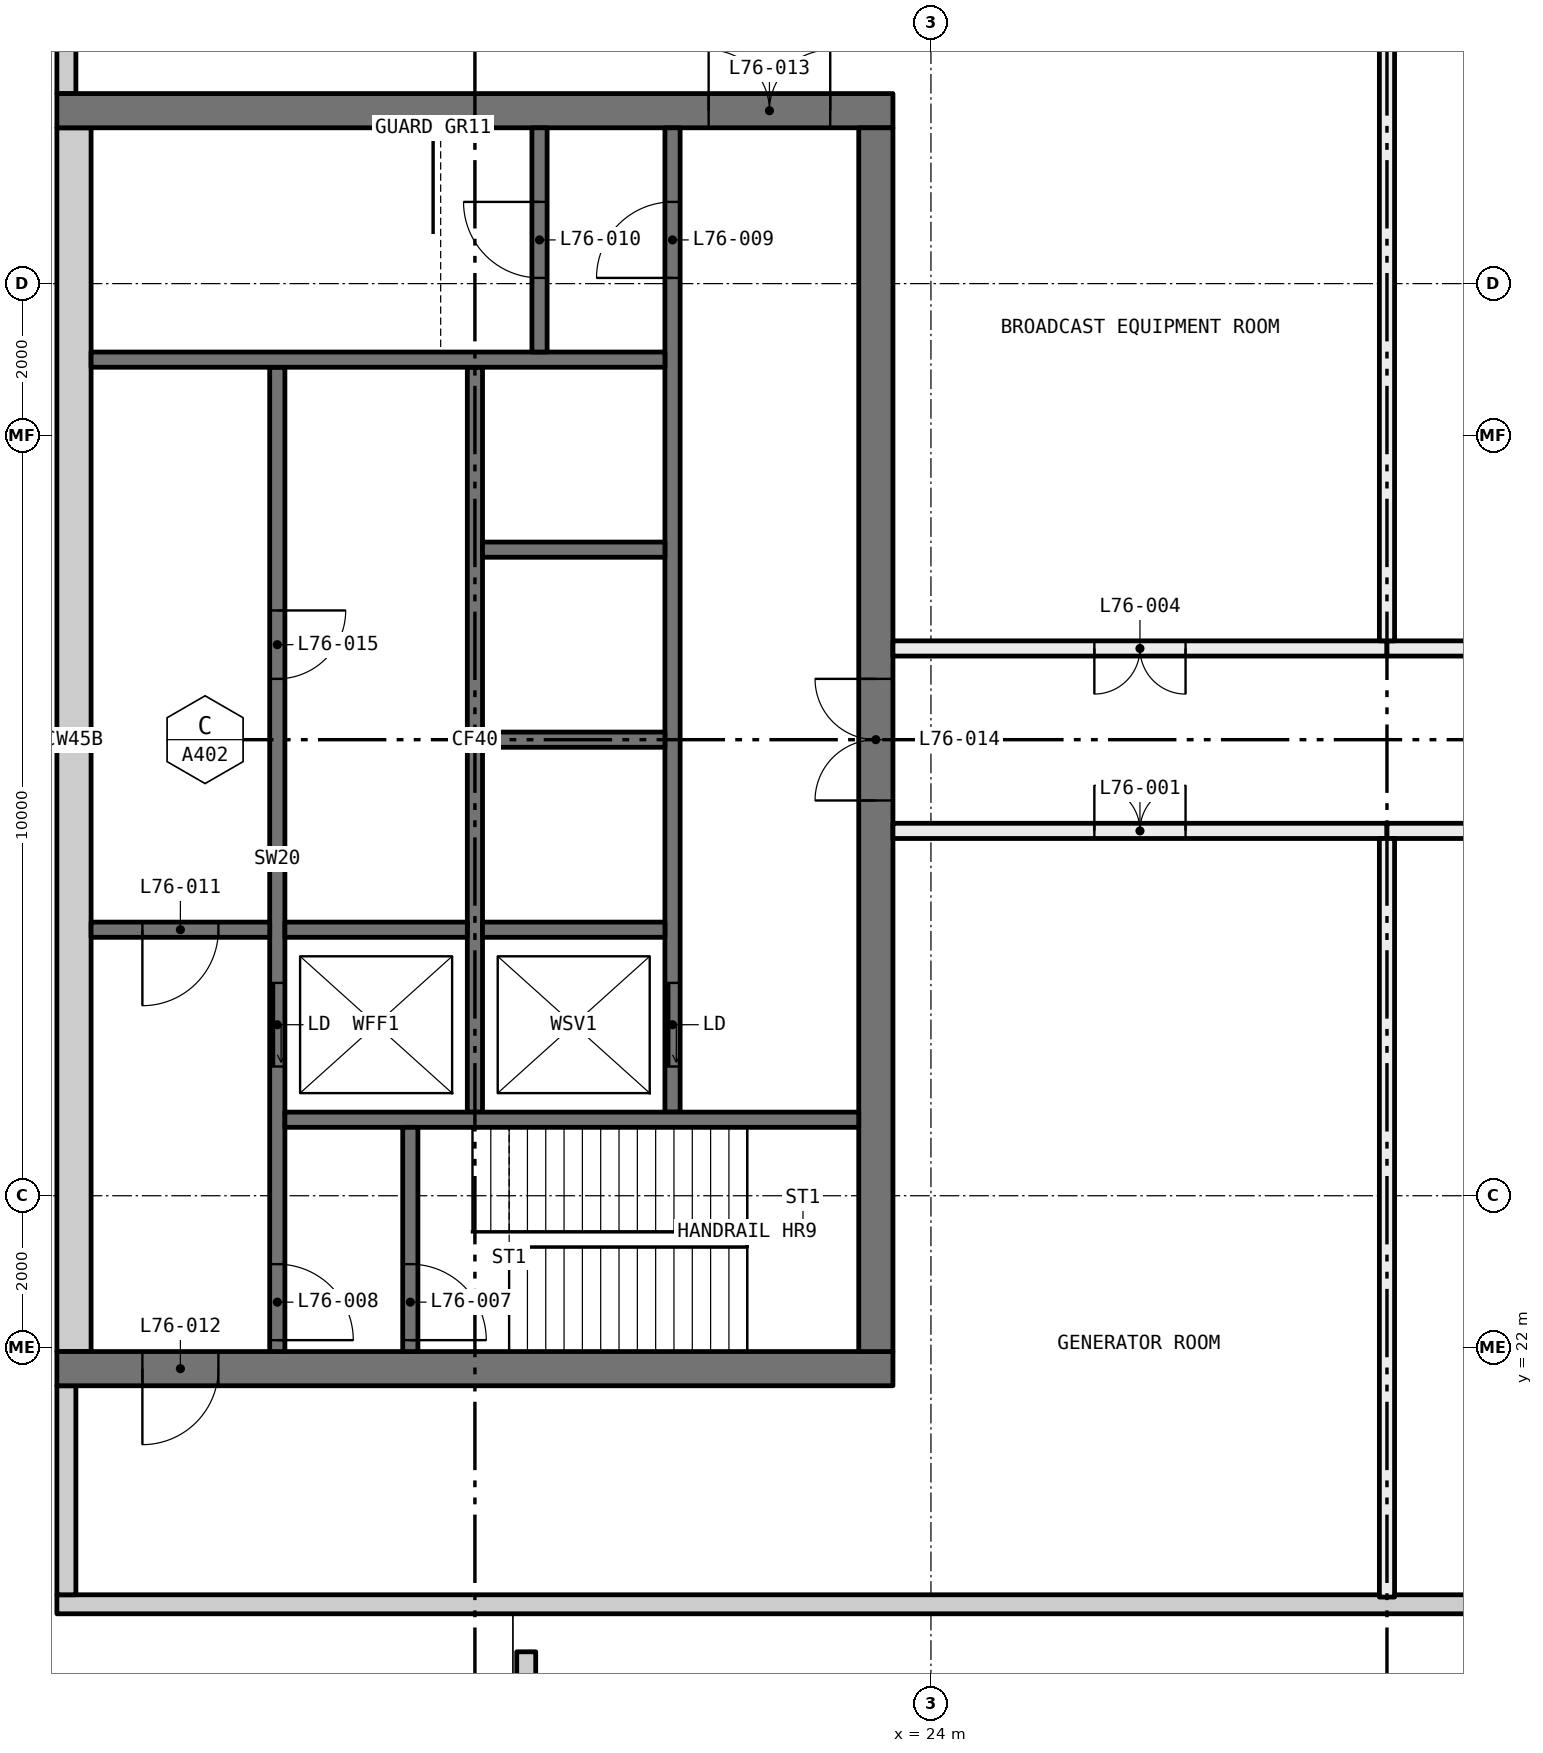
"""IFC4 building model, lengths in metres.
Left out: names, types, materials, properties, quantities, classifications, styles, units other than length and angle.
Written with IfcOpenShell. Run it as: python <this file> out.ifc"""

import sys

from ifc_helpers import new_model, si_unit, direction, frame, frame_2d, origin, place, context, subcontext, project, spatial, rectangle, extrude, element, fill, save


model = new_model("IFC4")
c1 = context("Model", 3, precision=1e-05, world=origin(), true_north=direction((0.0, 1.0)))
c2 = subcontext(c1, "Body", "Model", "MODEL_VIEW")
j1 = project(units=[si_unit("LENGTHUNIT", "METRE"), si_unit("PLANEANGLEUNIT", "RADIAN")], contexts=[c1])
p1 = place(None, origin())
s1 = spatial("IfcSite", under=j1, at=p1, CompositionType="ELEMENT")
p2 = place(p1, origin())
s2 = spatial("IfcBuilding", under=s1, at=p2, CompositionType="ELEMENT")
p3 = place(p2, frame((0.0, 0.0, 283.35)))
s3 = spatial("IfcBuildingStorey", under=s2, at=p3, CompositionType="ELEMENT", Elevation=283.35)
p4 = place(p3, frame((18.675, 12.8, 0.0), z_axis=(0.0, 0.0, 1.0), x_axis=(0.0, 1.0, 0.0)))
e1 = element("IfcWall", 1, at=p4, inside=s3, PredefinedType="PARAPET", context=c2, shape_type="SweptSolid", body=[
    extrude(rectangle(XDim=5.2, YDim=0.25, at=frame_2d((2.6, 0.0))), origin(), (0.0, 0.0, 1.0), 1.1),
])
p5 = place(p3, frame((23.5, 28.8, 0.0), z_axis=(0.0, 0.0, 1.0), x_axis=(1.0, 0.0, 0.0)))
e2 = element("IfcWall", 2, at=p5, inside=s3, PredefinedType="PARTITIONING", context=c2, shape_type="SweptSolid", body=[
    extrude(rectangle(XDim=6.5, YDim=0.2, at=frame_2d((3.25, 0.0))), origin(), (0.0, 0.0, 1.0), 3.6),
])
p6 = place(p5, frame((2.65, 0.0, 0.0)))
e3 = element("IfcOpeningElement", 3, at=p6, cuts=e2, PredefinedType="OPENING", context=c2, shape_type="SweptSolid", body=[
    extrude(rectangle(XDim=1.2, YDim=2.1, at=frame_2d((0.6, 1.05))), frame((0.0, 0.11, 0.0), z_axis=(0.0, -1.0, 0.0), x_axis=(1.0, 0.0, 0.0)), (0.0, 0.0, 1.0), 0.22),
])
p7 = place(p3, frame((30.0, 28.8, 0.0), z_axis=(0.0, 0.0, 1.0), x_axis=(1.0, 0.0, 0.0)))
e4 = element("IfcWall", 4, at=p7, inside=s3, PredefinedType="PARTITIONING", context=c2, shape_type="SweptSolid", body=[
    extrude(rectangle(XDim=12.0, YDim=0.2, at=frame_2d((6.0, 0.0))), origin(), (0.0, 0.0, 1.0), 3.6),
])
p8 = place(p7, frame((5.4, 0.0, 0.0)))
e5 = element("IfcOpeningElement", 5, at=p8, cuts=e4, PredefinedType="OPENING", context=c2, shape_type="SweptSolid", body=[
    extrude(rectangle(XDim=1.2, YDim=2.1, at=frame_2d((0.6, 1.05))), frame((0.0, 0.11, 0.0), z_axis=(0.0, -1.0, 0.0), x_axis=(1.0, 0.0, 0.0)), (0.0, 0.0, 1.0), 0.22),
])
p9 = place(p3, frame((30.0, 31.2, 0.0), z_axis=(0.0, 0.0, 1.0), x_axis=(-1.0, 0.0, 0.0)))
e6 = element("IfcWall", 6, at=p9, inside=s3, PredefinedType="PARTITIONING", context=c2, shape_type="SweptSolid", body=[
    extrude(rectangle(XDim=6.5, YDim=0.2, at=frame_2d((3.25, 0.0))), origin(), (0.0, 0.0, 1.0), 3.6),
])
p10 = place(p9, frame((2.65, 0.0, 0.0)))
e7 = element("IfcOpeningElement", 7, at=p10, cuts=e6, PredefinedType="OPENING", context=c2, shape_type="SweptSolid", body=[
    extrude(rectangle(XDim=1.2, YDim=2.1, at=frame_2d((0.6, 1.05))), frame((0.0, 0.11, 0.0), z_axis=(0.0, -1.0, 0.0), x_axis=(1.0, 0.0, 0.0)), (0.0, 0.0, 1.0), 0.22),
])
p11 = place(p3, frame((42.0, 31.2, 0.0), z_axis=(0.0, 0.0, 1.0), x_axis=(-1.0, 0.0, 0.0)))
e8 = element("IfcWall", 8, at=p11, inside=s3, PredefinedType="PARTITIONING", context=c2, shape_type="SweptSolid", body=[
    extrude(rectangle(XDim=12.0, YDim=0.2, at=frame_2d((6.0, 0.0))), origin(), (0.0, 0.0, 1.0), 3.6),
])
p12 = place(p11, frame((5.4, 0.0, 0.0)))
e9 = element("IfcOpeningElement", 9, at=p12, cuts=e8, PredefinedType="OPENING", context=c2, shape_type="SweptSolid", body=[
    extrude(rectangle(XDim=1.2, YDim=2.1, at=frame_2d((0.6, 1.05))), frame((0.0, 0.11, 0.0), z_axis=(0.0, -1.0, 0.0), x_axis=(1.0, 0.0, 0.0)), (0.0, 0.0, 1.0), 0.22),
])
for number, where, z_axis, x_axis in (
    (10, (30.0, 18.72, 0.0), (0.0, 0.0, 1.0), (0.0, 1.0, 0.0)),
    (11, (30.0, 31.3, 0.0), (0.0, 0.0, 1.0), (0.0, 1.0, 0.0)),
):
    element("IfcWall", number, at=place(p3, frame(where, z_axis=z_axis, x_axis=x_axis)), inside=s3, PredefinedType="PARTITIONING", context=c2, shape_type="SweptSolid", body=[
        extrude(rectangle(XDim=9.98, YDim=0.2, at=frame_2d((4.99, 0.0))), origin(), (0.0, 0.0, 1.0), 5.6),
    ])
p13 = place(p3, frame((12.5, 21.725, 0.0), z_axis=(0.0, 0.0, 1.0), x_axis=(1.0, 0.0, 0.0)))
e12 = element("IfcWall", 12, at=p13, inside=s3, PredefinedType="SHEAR", context=c2, shape_type="SweptSolid", body=[
    extrude(rectangle(XDim=11.0, YDim=0.45, at=frame_2d((5.5, 0.0))), origin(), (0.0, 0.0, 1.0), 5.6),
])
p14 = place(p13, frame((1.125, 0.0, 0.0)))
e13 = element("IfcOpeningElement", 13, at=p14, cuts=e12, PredefinedType="OPENING", context=c2, shape_type="SweptSolid", body=[
    extrude(rectangle(XDim=1.0, YDim=2.1, at=frame_2d((0.5, 1.05))), frame((0.0, 0.235, 0.0), z_axis=(0.0, -1.0, 0.0), x_axis=(1.0, 0.0, 0.0)), (0.0, 0.0, 1.0), 0.47),
])
p15 = place(p3, frame((12.5, 38.275, 0.0), z_axis=(0.0, 0.0, 1.0), x_axis=(1.0, 0.0, 0.0)))
e14 = element("IfcWall", 14, at=p15, inside=s3, PredefinedType="SHEAR", context=c2, shape_type="SweptSolid", body=[
    extrude(rectangle(XDim=11.0, YDim=0.45, at=frame_2d((5.5, 0.0))), origin(), (0.0, 0.0, 1.0), 5.6),
])
p16 = place(p15, frame((8.575, 0.0, 0.0)))
e15 = element("IfcOpeningElement", 15, at=p16, cuts=e14, PredefinedType="OPENING", context=c2, shape_type="SweptSolid", body=[
    extrude(rectangle(XDim=1.6, YDim=2.1, at=frame_2d((0.8, 1.05))), frame((0.0, 0.235, 0.0), z_axis=(0.0, -1.0, 0.0), x_axis=(1.0, 0.0, 0.0)), (0.0, 0.0, 1.0), 0.47),
])
p17 = place(p3, frame((12.725, 21.95, 0.0), z_axis=(0.0, 0.0, 1.0), x_axis=(0.0, 1.0, 0.0)))
e16 = element("IfcWall", 16, at=p17, inside=s3, PredefinedType="SHEAR", context=c2, shape_type="SweptSolid", body=[
    extrude(rectangle(XDim=16.1, YDim=0.45, at=frame_2d((8.05, 0.0))), origin(), (0.0, 0.0, 1.0), 5.6),
])
p18 = place(p3, frame((23.275, 21.95, 0.0), z_axis=(0.0, 0.0, 1.0), x_axis=(0.0, 1.0, 0.0)))
e17 = element("IfcWall", 17, at=p18, inside=s3, PredefinedType="SHEAR", context=c2, shape_type="SweptSolid", body=[
    extrude(rectangle(XDim=16.1, YDim=0.45, at=frame_2d((8.05, 0.0))), origin(), (0.0, 0.0, 1.0), 5.6),
])
p19 = place(p18, frame((7.25, 0.0, 0.0)))
e18 = element("IfcOpeningElement", 18, at=p19, cuts=e17, PredefinedType="OPENING", context=c2, shape_type="SweptSolid", body=[
    extrude(rectangle(XDim=1.6, YDim=2.1, at=frame_2d((0.8, 1.05))), frame((0.0, 0.235, 0.0), z_axis=(0.0, -1.0, 0.0), x_axis=(1.0, 0.0, 0.0)), (0.0, 0.0, 1.0), 0.47),
])
p20 = place(p3, frame((15.4, 21.95, 0.0), z_axis=(0.0, 0.0, 1.0), x_axis=(0.0, 1.0, 0.0)))
e19 = element("IfcWall", 19, at=p20, inside=s3, PredefinedType="SOLIDWALL", context=c2, shape_type="SweptSolid", body=[
    extrude(rectangle(XDim=12.95, YDim=0.2, at=frame_2d((6.475, 0.0))), origin(), (0.0, 0.0, 1.0), 5.6),
])
p21 = place(p20, frame((3.75, 0.0, 0.0)))
e20 = element("IfcOpeningElement", 20, at=p21, cuts=e19, PredefinedType="OPENING", context=c2, shape_type="SweptSolid", body=[
    extrude(rectangle(XDim=1.1, YDim=2.1, at=frame_2d((0.55, 1.05))), frame((0.0, 0.11, 0.0), z_axis=(0.0, -1.0, 0.0), x_axis=(1.0, 0.0, 0.0)), (0.0, 0.0, 1.0), 0.22),
])
p22 = place(p20, frame((0.15, 0.0, 0.0)))
e21 = element("IfcOpeningElement", 21, at=p22, cuts=e19, PredefinedType="OPENING", context=c2, shape_type="SweptSolid", body=[
    extrude(rectangle(XDim=1.0, YDim=2.1, at=frame_2d((0.5, 1.05))), frame((0.0, 0.11, 0.0), z_axis=(0.0, -1.0, 0.0), x_axis=(1.0, 0.0, 0.0)), (0.0, 0.0, 1.0), 0.22),
])
p23 = place(p20, frame((8.85, 0.0, 0.0)))
e22 = element("IfcOpeningElement", 22, at=p23, cuts=e19, PredefinedType="OPENING", context=c2, shape_type="SweptSolid", body=[
    extrude(rectangle(XDim=0.9, YDim=2.1, at=frame_2d((0.45, 1.05))), frame((0.0, 0.11, 0.0), z_axis=(0.0, -1.0, 0.0), x_axis=(1.0, 0.0, 0.0)), (0.0, 0.0, 1.0), 0.22),
])
p24 = place(p3, frame((20.6, 25.1, 0.0), z_axis=(0.0, 0.0, 1.0), x_axis=(0.0, 1.0, 0.0)))
e23 = element("IfcWall", 23, at=p24, inside=s3, PredefinedType="SOLIDWALL", context=c2, shape_type="SweptSolid", body=[
    extrude(rectangle(XDim=12.95, YDim=0.2, at=frame_2d((6.475, 0.0))), origin(), (0.0, 0.0, 1.0), 5.6),
])
p25 = place(p24, frame((0.6, 0.0, 0.0)))
e24 = element("IfcOpeningElement", 24, at=p25, cuts=e23, PredefinedType="OPENING", context=c2, shape_type="SweptSolid", body=[
    extrude(rectangle(XDim=1.1, YDim=2.1, at=frame_2d((0.55, 1.05))), frame((0.0, 0.11, 0.0), z_axis=(0.0, -1.0, 0.0), x_axis=(1.0, 0.0, 0.0)), (0.0, 0.0, 1.0), 0.22),
])
p26 = place(p24, frame((10.975, 0.0, 0.0)))
e25 = element("IfcOpeningElement", 25, at=p26, cuts=e23, PredefinedType="OPENING", context=c2, shape_type="SweptSolid", body=[
    extrude(rectangle(XDim=1.0, YDim=2.1, at=frame_2d((0.5, 1.05))), frame((0.0, 0.11, 0.0), z_axis=(0.0, -1.0, 0.0), x_axis=(1.0, 0.0, 0.0)), (0.0, 0.0, 1.0), 0.22),
])
p27 = place(p3, frame((18.0, 25.1, 0.0), z_axis=(0.0, 0.0, 1.0), x_axis=(0.0, 1.0, 0.0)))
e26 = element("IfcWall", 26, at=p27, inside=s3, PredefinedType="SOLIDWALL", context=c2, shape_type="SweptSolid", body=[
    extrude(rectangle(XDim=9.8, YDim=0.2, at=frame_2d((4.9, 0.0))), origin(), (0.0, 0.0, 1.0), 5.6),
])
for number, where, z_axis, x_axis in (
    (27, (15.5, 25.0, 0.0), (0.0, 0.0, 1.0), (1.0, 0.0, 0.0)),
    (28, (12.95, 35.0, 0.0), (0.0, 0.0, 1.0), (1.0, 0.0, 0.0)),
):
    element("IfcWall", number, at=place(p3, frame(where, z_axis=z_axis, x_axis=x_axis)), inside=s3, PredefinedType="SOLIDWALL", context=c2, shape_type="SweptSolid", body=[
        extrude(rectangle(XDim=7.55, YDim=0.2, at=frame_2d((3.775, 0.0))), origin(), (0.0, 0.0, 1.0), 5.6),
    ])
p28 = place(p3, frame((12.95, 27.5, 0.0), z_axis=(0.0, 0.0, 1.0), x_axis=(1.0, 0.0, 0.0)))
e29 = element("IfcWall", 29, at=p28, inside=s3, PredefinedType="SOLIDWALL", context=c2, shape_type="SweptSolid", body=[
    extrude(rectangle(XDim=2.35, YDim=0.2, at=frame_2d((1.175, 0.0))), origin(), (0.0, 0.0, 1.0), 5.6),
])
p29 = place(p28, frame((0.675, 0.0, 0.0)))
e30 = element("IfcOpeningElement", 30, at=p29, cuts=e29, PredefinedType="OPENING", context=c2, shape_type="SweptSolid", body=[
    extrude(rectangle(XDim=1.0, YDim=2.1, at=frame_2d((0.5, 1.05))), frame((0.0, 0.11, 0.0), z_axis=(0.0, -1.0, 0.0), x_axis=(1.0, 0.0, 0.0)), (0.0, 0.0, 1.0), 0.22),
])
p30 = place(p3, frame((17.15, 21.95, 0.0), z_axis=(0.0, 0.0, 1.0), x_axis=(0.0, 1.0, 0.0)))
e31 = element("IfcWall", 31, at=p30, inside=s3, PredefinedType="SOLIDWALL", context=c2, shape_type="SweptSolid", body=[
    extrude(rectangle(XDim=2.95, YDim=0.2, at=frame_2d((1.475, 0.0))), origin(), (0.0, 0.0, 1.0), 5.6),
])
p31 = place(p30, frame((0.15, 0.0, 0.0)))
e32 = element("IfcOpeningElement", 32, at=p31, cuts=e31, PredefinedType="OPENING", context=c2, shape_type="SweptSolid", body=[
    extrude(rectangle(XDim=1.0, YDim=2.1, at=frame_2d((0.5, 1.05))), frame((0.0, 0.11, 0.0), z_axis=(0.0, -1.0, 0.0), x_axis=(1.0, 0.0, 0.0)), (0.0, 0.0, 1.0), 0.22),
])
p32 = place(p3, frame((18.85, 35.1, 0.0), z_axis=(0.0, 0.0, 1.0), x_axis=(0.0, 1.0, 0.0)))
e33 = element("IfcWall", 33, at=p32, inside=s3, PredefinedType="SOLIDWALL", context=c2, shape_type="SweptSolid", body=[
    extrude(rectangle(XDim=2.95, YDim=0.2, at=frame_2d((1.475, 0.0))), origin(), (0.0, 0.0, 1.0), 5.6),
])
p33 = place(p32, frame((0.975, 0.0, 0.0)))
e34 = element("IfcOpeningElement", 34, at=p33, cuts=e33, PredefinedType="OPENING", context=c2, shape_type="SweptSolid", body=[
    extrude(rectangle(XDim=1.0, YDim=2.1, at=frame_2d((0.5, 1.05))), frame((0.0, 0.11, 0.0), z_axis=(0.0, -1.0, 0.0), x_axis=(1.0, 0.0, 0.0)), (0.0, 0.0, 1.0), 0.22),
])
for number, where, z_axis, x_axis in (
    (35, (15.5, 27.5, 0.0), (0.0, 0.0, 1.0), (1.0, 0.0, 0.0)),
    (36, (18.1, 27.5, 0.0), (0.0, 0.0, 1.0), (1.0, 0.0, 0.0)),
    (37, (18.1, 30.0, 0.0), (0.0, 0.0, 1.0), (1.0, 0.0, 0.0)),
    (38, (18.1, 32.5, 0.0), (0.0, 0.0, 1.0), (1.0, 0.0, 0.0)),
):
    element("IfcWall", number, at=place(p3, frame(where, z_axis=z_axis, x_axis=x_axis)), inside=s3, PredefinedType="SOLIDWALL", context=c2, shape_type="SweptSolid", body=[
        extrude(rectangle(XDim=2.4, YDim=0.2, at=frame_2d((1.2, 0.0))), origin(), (0.0, 0.0, 1.0), 5.6),
    ])
p34 = place(p3, frame((12.5, 18.625, 0.0), z_axis=(0.0, 0.0, 1.0), x_axis=(1.0, 0.0, 0.0)))
e39 = element("IfcWall", 39, at=p34, inside=s3, PredefinedType="SOLIDWALL", context=c2, shape_type="SweptSolid", body=[
    extrude(rectangle(XDim=22.0, YDim=0.25, at=frame_2d((11.0, 0.0))), origin(), (0.0, 0.0, 1.0), 1.2),
])
for number, where, z_axis, x_axis in (
    (40, (12.625, 18.75, 0.0), (0.0, 0.0, 1.0), (0.0, 1.0, 0.0)),
    (41, (12.625, 38.5, 0.0), (0.0, 0.0, 1.0), (0.0, 1.0, 0.0)),
):
    element("IfcWall", number, at=place(p3, frame(where, z_axis=z_axis, x_axis=x_axis)), inside=s3, PredefinedType="SOLIDWALL", context=c2, shape_type="SweptSolid", body=[
        extrude(rectangle(XDim=2.75, YDim=0.25, at=frame_2d((1.375, 0.0))), origin(), (0.0, 0.0, 1.0), 1.2),
    ])
p35 = place(p6, origin())
e42 = element("IfcDoor", 42, at=p35, inside=s3, OperationType="DOUBLE_DOOR_SINGLE_SWING", PredefinedType="DOOR", context=c2, shape_type="SweptSolid", body=[
    extrude(rectangle(XDim=1.2, YDim=2.1, at=frame_2d((0.6, 1.05))), frame((0.0, 0.025, 0.0), z_axis=(0.0, -1.0, 0.0), x_axis=(1.0, 0.0, 0.0)), (0.0, 0.0, 1.0), 0.05),
])
fill(e3, e42)
p36 = place(p10, origin())
e43 = element("IfcDoor", 43, at=p36, inside=s3, OperationType="DOUBLE_DOOR_SINGLE_SWING", PredefinedType="DOOR", context=c2, shape_type="SweptSolid", body=[
    extrude(rectangle(XDim=1.2, YDim=2.1, at=frame_2d((0.6, 1.05))), frame((0.0, 0.025, 0.0), z_axis=(0.0, -1.0, 0.0), x_axis=(1.0, 0.0, 0.0)), (0.0, 0.0, 1.0), 0.05),
])
fill(e7, e43)
p37 = place(p25, origin())
e44 = element("IfcDoor", 44, at=p37, inside=s3, OperationType="SLIDING_TO_LEFT", PredefinedType="DOOR", context=c2, shape_type="SweptSolid", body=[
    extrude(rectangle(XDim=1.1, YDim=2.1, at=frame_2d((0.55, 1.05))), frame((0.0, 0.025, 0.0), z_axis=(0.0, -1.0, 0.0), x_axis=(1.0, 0.0, 0.0)), (0.0, 0.0, 1.0), 0.05),
])
fill(e24, e44)
p38 = place(p21, origin())
e45 = element("IfcDoor", 45, at=p38, inside=s3, OperationType="SLIDING_TO_LEFT", PredefinedType="DOOR", context=c2, shape_type="SweptSolid", body=[
    extrude(rectangle(XDim=1.1, YDim=2.1, at=frame_2d((0.55, 1.05))), frame((0.0, 0.025, 0.0), z_axis=(0.0, -1.0, 0.0), x_axis=(1.0, 0.0, 0.0)), (0.0, 0.0, 1.0), 0.05),
])
fill(e20, e45)
p39 = place(p31, frame((1.0, 0.0, 0.0), x_axis=(-1.0, 0.0, 0.0)))
e46 = element("IfcDoor", 46, at=p39, inside=s3, OperationType="SINGLE_SWING_LEFT", PredefinedType="DOOR", context=c2, shape_type="SweptSolid", body=[
    extrude(rectangle(XDim=1.0, YDim=2.1, at=frame_2d((0.5, 1.05))), frame((0.0, 0.025, 0.0), z_axis=(0.0, -1.0, 0.0), x_axis=(1.0, 0.0, 0.0)), (0.0, 0.0, 1.0), 0.05),
])
fill(e32, e46)
p40 = place(p22, frame((1.0, 0.0, 0.0), x_axis=(-1.0, 0.0, 0.0)))
e47 = element("IfcDoor", 47, at=p40, inside=s3, OperationType="SINGLE_SWING_LEFT", PredefinedType="DOOR", context=c2, shape_type="SweptSolid", body=[
    extrude(rectangle(XDim=1.0, YDim=2.1, at=frame_2d((0.5, 1.05))), frame((0.0, 0.025, 0.0), z_axis=(0.0, -1.0, 0.0), x_axis=(1.0, 0.0, 0.0)), (0.0, 0.0, 1.0), 0.05),
])
fill(e21, e47)
p41 = place(p26, origin())
e48 = element("IfcDoor", 48, at=p41, inside=s3, OperationType="SINGLE_SWING_RIGHT", PredefinedType="DOOR", context=c2, shape_type="SweptSolid", body=[
    extrude(rectangle(XDim=1.0, YDim=2.1, at=frame_2d((0.5, 1.05))), frame((0.0, 0.025, 0.0), z_axis=(0.0, -1.0, 0.0), x_axis=(1.0, 0.0, 0.0)), (0.0, 0.0, 1.0), 0.05),
])
fill(e25, e48)
p42 = place(p33, origin())
e49 = element("IfcDoor", 49, at=p42, inside=s3, OperationType="SINGLE_SWING_LEFT", PredefinedType="DOOR", context=c2, shape_type="SweptSolid", body=[
    extrude(rectangle(XDim=1.0, YDim=2.1, at=frame_2d((0.5, 1.05))), frame((0.0, 0.025, 0.0), z_axis=(0.0, -1.0, 0.0), x_axis=(1.0, 0.0, 0.0)), (0.0, 0.0, 1.0), 0.05),
])
fill(e34, e49)
p43 = place(p29, frame((1.0, 0.0, 0.0), x_axis=(-1.0, 0.0, 0.0)))
e50 = element("IfcDoor", 50, at=p43, inside=s3, OperationType="SINGLE_SWING_LEFT", PredefinedType="DOOR", context=c2, shape_type="SweptSolid", body=[
    extrude(rectangle(XDim=1.0, YDim=2.1, at=frame_2d((0.5, 1.05))), frame((0.0, 0.025, 0.0), z_axis=(0.0, -1.0, 0.0), x_axis=(1.0, 0.0, 0.0)), (0.0, 0.0, 1.0), 0.05),
])
fill(e30, e50)
p44 = place(p14, frame((1.0, 0.0, 0.0), x_axis=(-1.0, 0.0, 0.0)))
e51 = element("IfcDoor", 51, at=p44, inside=s3, OperationType="SINGLE_SWING_LEFT", PredefinedType="DOOR", context=c2, shape_type="SweptSolid", body=[
    extrude(rectangle(XDim=1.0, YDim=2.1, at=frame_2d((0.5, 1.05))), frame((0.0, 0.025, 0.0), z_axis=(0.0, -1.0, 0.0), x_axis=(1.0, 0.0, 0.0)), (0.0, 0.0, 1.0), 0.05),
])
fill(e13, e51)
p45 = place(p16, origin())
e52 = element("IfcDoor", 52, at=p45, inside=s3, OperationType="DOUBLE_DOOR_SINGLE_SWING", PredefinedType="DOOR", context=c2, shape_type="SweptSolid", body=[
    extrude(rectangle(XDim=1.6, YDim=2.1, at=frame_2d((0.8, 1.05))), frame((0.0, 0.025, 0.0), z_axis=(0.0, -1.0, 0.0), x_axis=(1.0, 0.0, 0.0)), (0.0, 0.0, 1.0), 0.05),
])
fill(e15, e52)
p46 = place(p19, origin())
e53 = element("IfcDoor", 53, at=p46, inside=s3, OperationType="DOUBLE_DOOR_SINGLE_SWING", PredefinedType="DOOR", context=c2, shape_type="SweptSolid", body=[
    extrude(rectangle(XDim=1.6, YDim=2.1, at=frame_2d((0.8, 1.05))), frame((0.0, 0.025, 0.0), z_axis=(0.0, -1.0, 0.0), x_axis=(1.0, 0.0, 0.0)), (0.0, 0.0, 1.0), 0.05),
])
fill(e18, e53)
p47 = place(p23, frame((0.9, 0.0, 0.0), x_axis=(-1.0, 0.0, 0.0)))
e54 = element("IfcDoor", 54, at=p47, inside=s3, OperationType="SINGLE_SWING_RIGHT", PredefinedType="DOOR", context=c2, shape_type="SweptSolid", body=[
    extrude(rectangle(XDim=0.9, YDim=2.1, at=frame_2d((0.45, 1.05))), frame((0.0, 0.025, 0.0), z_axis=(0.0, -1.0, 0.0), x_axis=(1.0, 0.0, 0.0)), (0.0, 0.0, 1.0), 0.05),
])
fill(e22, e54)
save(model, sys.argv[1])
